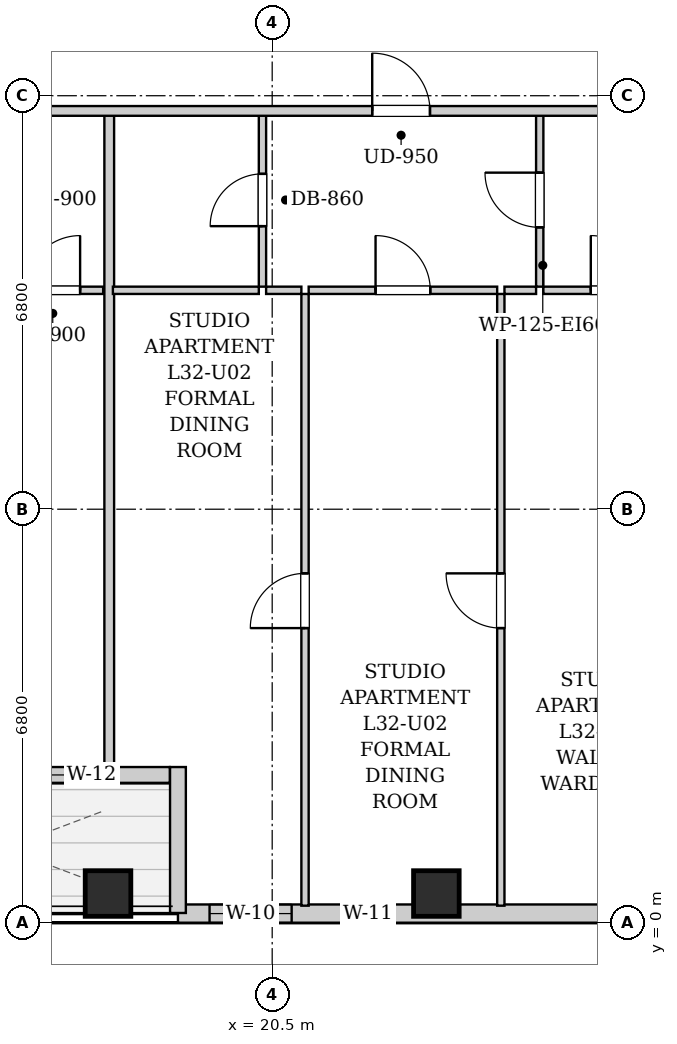
"""IFC4 building model, lengths in metres.
Left out: names, types, materials, properties, quantities, classifications, styles, units other than length and angle.
Written with IfcOpenShell. Run it as: python <this file> out.ifc"""

import sys

from ifc_helpers import new_model, si_unit, direction, frame, frame_2d, origin, origin_2d, place, context, subcontext, project, spatial, rectangle, extrude, element, fill, save


model = new_model("IFC4")
c1 = context("Model", 3, precision=1e-05, world=origin(), true_north=direction((0.0, 1.0)))
c2 = subcontext(c1, "Body", "Model", "MODEL_VIEW")
j1 = project(units=[si_unit("LENGTHUNIT", "METRE"), si_unit("PLANEANGLEUNIT", "RADIAN")], contexts=[c1])
p1 = place(None, origin())
s1 = spatial("IfcSite", under=j1, at=p1, CompositionType="ELEMENT")
p2 = place(p1, origin())
s2 = spatial("IfcBuilding", under=s1, at=p2, CompositionType="ELEMENT")
p3 = place(p2, frame((0.0, 0.0, 113.5)))
s3 = spatial("IfcBuildingStorey", under=s2, at=p3, CompositionType="ELEMENT", Elevation=113.5)
for number, where, z_axis, x_axis in (
    (1, (17.8, 0.48, 0.0), (0.0, 0.0, 1.0), (1.0, 0.0, 0.0)),
    (2, (23.2, 0.48, 0.0), (0.0, 0.0, 1.0), (1.0, 0.0, 0.0)),
):
    element("IfcColumn", number, at=place(p3, frame(where, z_axis=z_axis, x_axis=x_axis)), inside=s3, PredefinedType="COLUMN", context=c2, shape_type="SweptSolid", body=[
        extrude(rectangle(XDim=0.75, YDim=0.75, at=origin_2d()), origin(), (0.0, 0.0, 1.0), 3.2),
    ])
p4 = place(p3, frame((40.9, 0.15, 0.0), z_axis=(0.0, 0.0, 1.0), x_axis=(-1.0, 0.0, 0.0)))
e3 = element("IfcWall", 3, at=p4, inside=s3, PredefinedType="SOLIDWALL", context=c2, shape_type="SweptSolid", body=[
    extrude(rectangle(XDim=21.95, YDim=0.3, at=frame_2d((10.975, 0.0))), origin(), (0.0, 0.0, 1.0), 2.94),
])
p5 = place(p4, frame((20.08, 0.0, 0.55)))
e4 = element("IfcOpeningElement", 4, at=p5, cuts=e3, PredefinedType="OPENING", context=c2, shape_type="SweptSolid", body=[
    extrude(rectangle(XDim=1.35, YDim=1.2, at=frame_2d((0.675, 0.6))), frame((0.0, 0.16, 0.0), z_axis=(0.0, -1.0, 0.0), x_axis=(1.0, 0.0, 0.0)), (0.0, 0.0, 1.0), 0.32),
])
p6 = place(p4, frame((18.4, 0.0, 0.55)))
e5 = element("IfcOpeningElement", 5, at=p6, cuts=e3, PredefinedType="OPENING", context=c2, shape_type="SweptSolid", body=[
    extrude(rectangle(XDim=0.85, YDim=1.2, at=frame_2d((0.425, 0.6))), frame((0.0, 0.16, 0.0), z_axis=(0.0, -1.0, 0.0), x_axis=(1.0, 0.0, 0.0)), (0.0, 0.0, 1.0), 0.32),
])
p7 = place(p4, frame((11.127, 0.0, 0.55)))
e6 = element("IfcOpeningElement", 6, at=p7, cuts=e3, PredefinedType="OPENING", context=c2, shape_type="SweptSolid", body=[
    extrude(rectangle(XDim=1.35, YDim=1.2, at=frame_2d((0.675, 0.6))), frame((0.0, 0.16, 0.0), z_axis=(0.0, -1.0, 0.0), x_axis=(1.0, 0.0, 0.0)), (0.0, 0.0, 1.0), 0.32),
])
p8 = place(p4, frame((8.235, 0.0, 0.55)))
e7 = element("IfcOpeningElement", 7, at=p8, cuts=e3, PredefinedType="OPENING", context=c2, shape_type="SweptSolid", body=[
    extrude(rectangle(XDim=1.35, YDim=1.2, at=frame_2d((0.675, 0.6))), frame((0.0, 0.16, 0.0), z_axis=(0.0, -1.0, 0.0), x_axis=(1.0, 0.0, 0.0)), (0.0, 0.0, 1.0), 0.32),
])
p9 = place(p4, frame((4.835, 0.0, 0.55)))
e8 = element("IfcOpeningElement", 8, at=p9, cuts=e3, PredefinedType="OPENING", context=c2, shape_type="SweptSolid", body=[
    extrude(rectangle(XDim=1.35, YDim=1.2, at=frame_2d((0.675, 0.6))), frame((0.0, 0.16, 0.0), z_axis=(0.0, -1.0, 0.0), x_axis=(1.0, 0.0, 0.0)), (0.0, 0.0, 1.0), 0.32),
])
p10 = place(p3, frame((18.95, 0.16, 0.0), z_axis=(0.0, 0.0, 1.0), x_axis=(0.0, 1.0, 0.0)))
e9 = element("IfcWall", 9, at=p10, inside=s3, PredefinedType="SOLIDWALL", context=c2, shape_type="SweptSolid", body=[
    extrude(rectangle(XDim=2.4, YDim=0.26, at=frame_2d((1.2, 0.0))), origin(), (0.0, 0.0, 1.0), 2.94),
])
p11 = place(p3, frame((18.816, 2.43, 0.0), z_axis=(0.0, 0.0, 1.0), x_axis=(-1.0, 0.0, 0.0)))
e10 = element("IfcWall", 10, at=p11, inside=s3, PredefinedType="SOLIDWALL", context=c2, shape_type="SweptSolid", body=[
    extrude(rectangle(XDim=5.432, YDim=0.26, at=frame_2d((2.716, 0.0))), origin(), (0.0, 0.0, 1.0), 2.94),
])
p12 = place(p11, frame((2.161, 0.0, 0.0)))
e11 = element("IfcOpeningElement", 11, at=p12, cuts=e10, PredefinedType="OPENING", context=c2, shape_type="SweptSolid", body=[
    extrude(rectangle(XDim=1.1, YDim=2.0, at=frame_2d((0.55, 1.0))), frame((0.0, 0.14, 0.0), z_axis=(0.0, -1.0, 0.0), x_axis=(1.0, 0.0, 0.0)), (0.0, 0.0, 1.0), 0.28),
])
p13 = place(p11, frame((3.625, 0.0, 0.85)))
e12 = element("IfcOpeningElement", 12, at=p13, cuts=e10, PredefinedType="OPENING", context=c2, shape_type="SweptSolid", body=[
    extrude(rectangle(XDim=1.35, YDim=1.65, at=frame_2d((0.675, 0.825))), frame((0.0, 0.14, 0.0), z_axis=(0.0, -1.0, 0.0), x_axis=(1.0, 0.0, 0.0)), (0.0, 0.0, 1.0), 0.28),
])
p14 = place(p11, frame((1.321, 0.0, 0.55)))
e13 = element("IfcOpeningElement", 13, at=p14, cuts=e10, PredefinedType="OPENING", context=c2, shape_type="SweptSolid", body=[
    extrude(rectangle(XDim=0.68, YDim=1.2, at=frame_2d((0.34, 0.6))), frame((0.0, 0.14, 0.0), z_axis=(0.0, -1.0, 0.0), x_axis=(1.0, 0.0, 0.0)), (0.0, 0.0, 1.0), 0.28),
])
p15 = place(p3, frame((16.062, 10.4, 0.0), z_axis=(0.0, 0.0, 1.0), x_axis=(1.0, 0.0, 0.0)))
e14 = element("IfcWall", 14, at=p15, inside=s3, PredefinedType="PARTITIONING", context=c2, shape_type="SweptSolid", body=[
    extrude(rectangle(XDim=1.658, YDim=0.12, at=frame_2d((0.829, 0.0))), origin(), (0.0, 0.0, 1.0), 2.94),
])
p16 = place(p15, frame((0.379, 0.0, 0.0)))
e15 = element("IfcOpeningElement", 15, at=p16, cuts=e14, PredefinedType="OPENING", context=c2, shape_type="SweptSolid", body=[
    extrude(rectangle(XDim=0.9, YDim=2.05, at=frame_2d((0.45, 1.025))), frame((0.0, 0.07, 0.0), z_axis=(0.0, -1.0, 0.0), x_axis=(1.0, 0.0, 0.0)), (0.0, 0.0, 1.0), 0.14),
])
p17 = place(p3, frame((17.82, 2.26, 0.0), z_axis=(0.0, 0.0, 1.0), x_axis=(0.0, 1.0, 0.0)))
e16 = element("IfcWall", 16, at=p17, inside=s3, PredefinedType="PARTITIONING", context=c2, shape_type="SweptSolid", body=[
    extrude(rectangle(XDim=11.05, YDim=0.16, at=frame_2d((5.525, 0.0))), origin(), (0.0, 0.0, 1.0), 2.313),
])
p18 = place(p3, frame((20.34, 10.46, 0.0), z_axis=(0.0, 0.0, 1.0), x_axis=(0.0, 1.0, 0.0)))
e17 = element("IfcWall", 17, at=p18, inside=s3, PredefinedType="PARTITIONING", context=c2, shape_type="SweptSolid", body=[
    extrude(rectangle(XDim=2.85, YDim=0.12, at=frame_2d((1.425, 0.0))), origin(), (0.0, 0.0, 1.0), 2.94),
])
p19 = place(p18, frame((0.995, 0.0, 0.0)))
e18 = element("IfcOpeningElement", 18, at=p19, cuts=e17, PredefinedType="OPENING", context=c2, shape_type="SweptSolid", body=[
    extrude(rectangle(XDim=0.86, YDim=2.05, at=frame_2d((0.43, 1.025))), frame((0.0, 0.07, 0.0), z_axis=(0.0, -1.0, 0.0), x_axis=(1.0, 0.0, 0.0)), (0.0, 0.0, 1.0), 0.14),
])
p20 = place(p3, frame((17.88, 10.4, 0.0), z_axis=(0.0, 0.0, 1.0), x_axis=(1.0, 0.0, 0.0)))
e19 = element("IfcWall", 19, at=p20, inside=s3, PredefinedType="PARTITIONING", context=c2, shape_type="SweptSolid", body=[
    extrude(rectangle(XDim=2.4, YDim=0.12, at=frame_2d((1.2, 0.0))), origin(), (0.0, 0.0, 1.0), 2.94),
])
p21 = place(p3, frame((24.9, 10.46, 0.0), z_axis=(0.0, 0.0, 1.0), x_axis=(0.0, 1.0, 0.0)))
e20 = element("IfcWall", 20, at=p21, inside=s3, PredefinedType="PARTITIONING", context=c2, shape_type="SweptSolid", body=[
    extrude(rectangle(XDim=2.85, YDim=0.12, at=frame_2d((1.425, 0.0))), origin(), (0.0, 0.0, 1.0), 2.94),
])
p22 = place(p21, frame((0.975, 0.0, 0.0)))
e21 = element("IfcOpeningElement", 21, at=p22, cuts=e20, PredefinedType="OPENING", context=c2, shape_type="SweptSolid", body=[
    extrude(rectangle(XDim=0.9, YDim=2.05, at=frame_2d((0.45, 1.025))), frame((0.0, 0.07, 0.0), z_axis=(0.0, -1.0, 0.0), x_axis=(1.0, 0.0, 0.0)), (0.0, 0.0, 1.0), 0.14),
])
p23 = place(p3, frame((20.4, 10.4, 0.0), z_axis=(0.0, 0.0, 1.0), x_axis=(1.0, 0.0, 0.0)))
e22 = element("IfcWall", 22, at=p23, inside=s3, PredefinedType="PARTITIONING", context=c2, shape_type="SweptSolid", body=[
    extrude(rectangle(XDim=0.58, YDim=0.12, at=frame_2d((0.29, 0.0))), origin(), (0.0, 0.0, 1.0), 2.94),
])
p24 = place(p3, frame((21.1, 10.4, 0.0), z_axis=(0.0, 0.0, 1.0), x_axis=(1.0, 0.0, 0.0)))
e23 = element("IfcWall", 23, at=p24, inside=s3, PredefinedType="PARTITIONING", context=c2, shape_type="SweptSolid", body=[
    extrude(rectangle(XDim=3.1, YDim=0.12, at=frame_2d((1.55, 0.0))), origin(), (0.0, 0.0, 1.0), 2.94),
])
p25 = place(p24, frame((1.1, 0.0, 0.0)))
e24 = element("IfcOpeningElement", 24, at=p25, cuts=e23, PredefinedType="OPENING", context=c2, shape_type="SweptSolid", body=[
    extrude(rectangle(XDim=0.9, YDim=2.05, at=frame_2d((0.45, 1.025))), frame((0.0, 0.07, 0.0), z_axis=(0.0, -1.0, 0.0), x_axis=(1.0, 0.0, 0.0)), (0.0, 0.0, 1.0), 0.14),
])
p26 = place(p3, frame((24.32, 10.4, 0.0), z_axis=(0.0, 0.0, 1.0), x_axis=(1.0, 0.0, 0.0)))
e25 = element("IfcWall", 25, at=p26, inside=s3, PredefinedType="PARTITIONING", context=c2, shape_type="SweptSolid", body=[
    extrude(rectangle(XDim=0.52, YDim=0.12, at=frame_2d((0.26, 0.0))), origin(), (0.0, 0.0, 1.0), 2.94),
])
p27 = place(p3, frame((24.96, 10.4, 0.0), z_axis=(0.0, 0.0, 1.0), x_axis=(1.0, 0.0, 0.0)))
e26 = element("IfcWall", 26, at=p27, inside=s3, PredefinedType="PARTITIONING", context=c2, shape_type="SweptSolid", body=[
    extrude(rectangle(XDim=2.46, YDim=0.12, at=frame_2d((1.23, 0.0))), origin(), (0.0, 0.0, 1.0), 2.94),
])
p28 = place(p27, frame((0.78, 0.0, 0.0)))
e27 = element("IfcOpeningElement", 27, at=p28, cuts=e26, PredefinedType="OPENING", context=c2, shape_type="SweptSolid", body=[
    extrude(rectangle(XDim=0.9, YDim=2.05, at=frame_2d((0.45, 1.025))), frame((0.0, 0.07, 0.0), z_axis=(0.0, -1.0, 0.0), x_axis=(1.0, 0.0, 0.0)), (0.0, 0.0, 1.0), 0.14),
])
p29 = place(p3, frame((21.04, 0.28, 0.0), z_axis=(0.0, 0.0, 1.0), x_axis=(0.0, 1.0, 0.0)))
e28 = element("IfcWall", 28, at=p29, inside=s3, PredefinedType="PARTITIONING", context=c2, shape_type="SweptSolid", body=[
    extrude(rectangle(XDim=10.06, YDim=0.12, at=frame_2d((5.03, 0.0))), origin(), (0.0, 0.0, 1.0), 2.94),
])
p30 = place(p29, frame((4.565, 0.0, 0.0)))
e29 = element("IfcOpeningElement", 29, at=p30, cuts=e28, PredefinedType="OPENING", context=c2, shape_type="SweptSolid", body=[
    extrude(rectangle(XDim=0.9, YDim=2.05, at=frame_2d((0.45, 1.025))), frame((0.0, 0.07, 0.0), z_axis=(0.0, -1.0, 0.0), x_axis=(1.0, 0.0, 0.0)), (0.0, 0.0, 1.0), 0.14),
])
p31 = place(p3, frame((24.26, 0.28, 0.0), z_axis=(0.0, 0.0, 1.0), x_axis=(0.0, 1.0, 0.0)))
e30 = element("IfcWall", 30, at=p31, inside=s3, PredefinedType="PARTITIONING", context=c2, shape_type="SweptSolid", body=[
    extrude(rectangle(XDim=10.06, YDim=0.12, at=frame_2d((5.03, 0.0))), origin(), (0.0, 0.0, 1.0), 2.94),
])
p32 = place(p31, frame((4.565, 0.0, 0.0)))
e31 = element("IfcOpeningElement", 31, at=p32, cuts=e30, PredefinedType="OPENING", context=c2, shape_type="SweptSolid", body=[
    extrude(rectangle(XDim=0.9, YDim=2.05, at=frame_2d((0.45, 1.025))), frame((0.0, 0.07, 0.0), z_axis=(0.0, -1.0, 0.0), x_axis=(1.0, 0.0, 0.0)), (0.0, 0.0, 1.0), 0.14),
])
p33 = place(p3, frame((10.05, 13.35, 0.0), z_axis=(0.0, 0.0, 1.0), x_axis=(1.0, 0.0, 0.0)))
e32 = element("IfcWall", 32, at=p33, inside=s3, PredefinedType="PARTITIONING", context=c2, shape_type="SweptSolid", body=[
    extrude(rectangle(XDim=30.8, YDim=0.16, at=frame_2d((15.4, 0.0))), origin(), (0.0, 0.0, 1.0), 2.94),
])
p34 = place(p33, frame((3.692, 0.0, 0.0)))
e33 = element("IfcOpeningElement", 33, at=p34, cuts=e32, PredefinedType="OPENING", context=c2, shape_type="SweptSolid", body=[
    extrude(rectangle(XDim=0.95, YDim=2.1, at=frame_2d((0.475, 1.05))), frame((0.0, 0.09, 0.0), z_axis=(0.0, -1.0, 0.0), x_axis=(1.0, 0.0, 0.0)), (0.0, 0.0, 1.0), 0.18),
])
p35 = place(p33, frame((12.095, 0.0, 0.0)))
e34 = element("IfcOpeningElement", 34, at=p35, cuts=e32, PredefinedType="OPENING", context=c2, shape_type="SweptSolid", body=[
    extrude(rectangle(XDim=0.95, YDim=2.1, at=frame_2d((0.475, 1.05))), frame((0.0, 0.09, 0.0), z_axis=(0.0, -1.0, 0.0), x_axis=(1.0, 0.0, 0.0)), (0.0, 0.0, 1.0), 0.18),
])
p36 = place(p16, origin())
e35 = element("IfcDoor", 35, at=p36, inside=s3, OperationType="SINGLE_SWING_RIGHT", PredefinedType="DOOR", context=c2, shape_type="SweptSolid", body=[
    extrude(rectangle(XDim=0.9, YDim=2.05, at=frame_2d((0.45, 1.025))), frame((0.0, 0.025, 0.0), z_axis=(0.0, -1.0, 0.0), x_axis=(1.0, 0.0, 0.0)), (0.0, 0.0, 1.0), 0.05),
])
fill(e15, e35)
p37 = place(p19, origin())
e36 = element("IfcDoor", 36, at=p37, inside=s3, OperationType="SINGLE_SWING_LEFT", PredefinedType="DOOR", context=c2, shape_type="SweptSolid", body=[
    extrude(rectangle(XDim=0.86, YDim=2.05, at=frame_2d((0.43, 1.025))), frame((0.0, 0.025, 0.0), z_axis=(0.0, -1.0, 0.0), x_axis=(1.0, 0.0, 0.0)), (0.0, 0.0, 1.0), 0.05),
])
fill(e18, e36)
p38 = place(p22, origin())
e37 = element("IfcDoor", 37, at=p38, inside=s3, OperationType="SINGLE_SWING_RIGHT", PredefinedType="DOOR", context=c2, shape_type="SweptSolid", body=[
    extrude(rectangle(XDim=0.9, YDim=2.05, at=frame_2d((0.45, 1.025))), frame((0.0, 0.025, 0.0), z_axis=(0.0, -1.0, 0.0), x_axis=(1.0, 0.0, 0.0)), (0.0, 0.0, 1.0), 0.05),
])
fill(e21, e37)
p39 = place(p25, origin())
e38 = element("IfcDoor", 38, at=p39, inside=s3, OperationType="SINGLE_SWING_LEFT", PredefinedType="DOOR", context=c2, shape_type="SweptSolid", body=[
    extrude(rectangle(XDim=0.9, YDim=2.05, at=frame_2d((0.45, 1.025))), frame((0.0, 0.025, 0.0), z_axis=(0.0, -1.0, 0.0), x_axis=(1.0, 0.0, 0.0)), (0.0, 0.0, 1.0), 0.05),
])
fill(e24, e38)
p40 = place(p28, origin())
e39 = element("IfcDoor", 39, at=p40, inside=s3, OperationType="SINGLE_SWING_LEFT", PredefinedType="DOOR", context=c2, shape_type="SweptSolid", body=[
    extrude(rectangle(XDim=0.9, YDim=2.05, at=frame_2d((0.45, 1.025))), frame((0.0, 0.025, 0.0), z_axis=(0.0, -1.0, 0.0), x_axis=(1.0, 0.0, 0.0)), (0.0, 0.0, 1.0), 0.05),
])
fill(e27, e39)
p41 = place(p30, origin())
e40 = element("IfcDoor", 40, at=p41, inside=s3, OperationType="SINGLE_SWING_LEFT", PredefinedType="DOOR", context=c2, shape_type="SweptSolid", body=[
    extrude(rectangle(XDim=0.9, YDim=2.05, at=frame_2d((0.45, 1.025))), frame((0.0, 0.025, 0.0), z_axis=(0.0, -1.0, 0.0), x_axis=(1.0, 0.0, 0.0)), (0.0, 0.0, 1.0), 0.05),
])
fill(e29, e40)
p42 = place(p32, origin())
e41 = element("IfcDoor", 41, at=p42, inside=s3, OperationType="SINGLE_SWING_RIGHT", PredefinedType="DOOR", context=c2, shape_type="SweptSolid", body=[
    extrude(rectangle(XDim=0.9, YDim=2.05, at=frame_2d((0.45, 1.025))), frame((0.0, 0.025, 0.0), z_axis=(0.0, -1.0, 0.0), x_axis=(1.0, 0.0, 0.0)), (0.0, 0.0, 1.0), 0.05),
])
fill(e31, e41)
p43 = place(p35, origin())
e42 = element("IfcDoor", 42, at=p43, inside=s3, OperationType="SINGLE_SWING_LEFT", PredefinedType="DOOR", context=c2, shape_type="SweptSolid", body=[
    extrude(rectangle(XDim=0.95, YDim=2.1, at=frame_2d((0.475, 1.05))), frame((0.0, 0.025, 0.0), z_axis=(0.0, -1.0, 0.0), x_axis=(1.0, 0.0, 0.0)), (0.0, 0.0, 1.0), 0.05),
])
fill(e34, e42)
p44 = place(p14, origin())
e43 = element("IfcWindow", 43, at=p44, inside=s3, PartitioningType="SINGLE_PANEL", PredefinedType="WINDOW", context=c2, shape_type="SweptSolid", body=[
    extrude(rectangle(XDim=0.68, YDim=1.2, at=frame_2d((0.34, 0.6))), frame((0.0, 0.03, 0.0), z_axis=(0.0, -1.0, 0.0), x_axis=(1.0, 0.0, 0.0)), (0.0, 0.0, 1.0), 0.06),
])
fill(e13, e43)
p45 = place(p5, origin())
e44 = element("IfcWindow", 44, at=p45, inside=s3, PartitioningType="SINGLE_PANEL", PredefinedType="WINDOW", context=c2, shape_type="SweptSolid", body=[
    extrude(rectangle(XDim=1.35, YDim=1.2, at=frame_2d((0.675, 0.6))), frame((0.0, 0.03, 0.0), z_axis=(0.0, -1.0, 0.0), x_axis=(1.0, 0.0, 0.0)), (0.0, 0.0, 1.0), 0.06),
])
fill(e4, e44)
p46 = place(p6, origin())
e45 = element("IfcWindow", 45, at=p46, inside=s3, PartitioningType="SINGLE_PANEL", PredefinedType="WINDOW", context=c2, shape_type="SweptSolid", body=[
    extrude(rectangle(XDim=0.85, YDim=1.2, at=frame_2d((0.425, 0.6))), frame((0.0, 0.03, 0.0), z_axis=(0.0, -1.0, 0.0), x_axis=(1.0, 0.0, 0.0)), (0.0, 0.0, 1.0), 0.06),
])
fill(e5, e45)
save(model, sys.argv[1])
